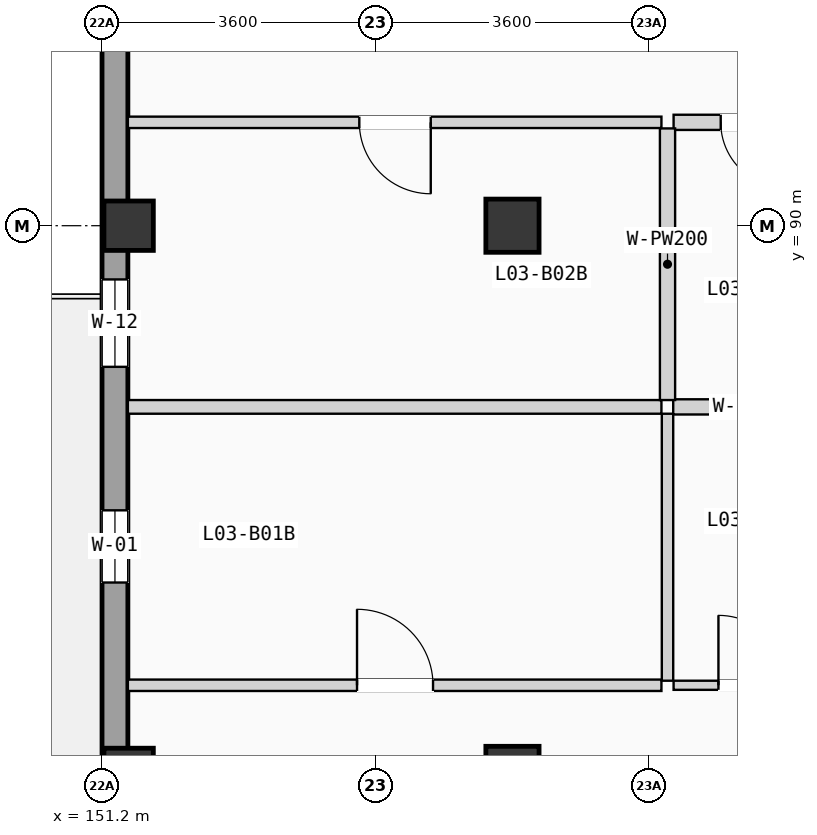
"""IFC4 building model, lengths in metres.
Left out: names, types, materials, properties, quantities, classifications, styles, units other than length and angle.
Written with IfcOpenShell. Run it as: python <this file> out.ifc"""

import sys

from ifc_helpers import new_model, si_unit, direction, frame, frame_2d, origin, origin_2d, place, context, subcontext, project, spatial, rectangle, extrude, element, fill, save


model = new_model("IFC4")
c1 = context("Model", 3, precision=1e-05, world=origin(), true_north=direction((0.0, 1.0)))
c2 = subcontext(c1, "Body", "Model", "MODEL_VIEW")
j1 = project(units=[si_unit("LENGTHUNIT", "METRE"), si_unit("PLANEANGLEUNIT", "RADIAN")], contexts=[c1])
p1 = place(None, origin())
s1 = spatial("IfcSite", under=j1, at=p1, CompositionType="ELEMENT")
p2 = place(p1, origin())
s2 = spatial("IfcBuilding", under=s1, at=p2, CompositionType="ELEMENT")
p3 = place(p2, frame((0.0, 0.0, 12.075)))
s3 = spatial("IfcBuildingStorey", under=s2, at=p3, CompositionType="ELEMENT", Elevation=12.075)
for number, where, z_axis, x_axis in (
    (1, (151.55, 82.8, 0.0), (0.0, 0.0, 1.0), (1.0, 0.0, 0.0)),
    (2, (151.55, 90.0, 0.0), (0.0, 0.0, 1.0), (1.0, 0.0, 0.0)),
):
    element("IfcColumn", number, at=place(p3, frame(where, z_axis=z_axis, x_axis=x_axis)), inside=s3, PredefinedType="COLUMN", context=c2, shape_type="SweptSolid", body=[
        extrude(rectangle(XDim=0.65, YDim=0.65, at=origin_2d()), origin(), (0.0, 0.0, 1.0), 3.15),
    ])
for number, where, z_axis, x_axis in (
    (3, (156.6, 82.8, 0.0), (0.0, 0.0, 1.0), (1.0, 0.0, 0.0)),
    (4, (156.6, 90.0, 0.0), (0.0, 0.0, 1.0), (1.0, 0.0, 0.0)),
):
    element("IfcColumn", number, at=place(p3, frame(where, z_axis=z_axis, x_axis=x_axis)), inside=s3, PredefinedType="COLUMN", context=c2, shape_type="SweptSolid", body=[
        extrude(rectangle(XDim=0.7, YDim=0.7, at=origin_2d()), origin(), (0.0, 0.0, 1.0), 3.15),
    ])
p4 = place(p3, frame((151.37, 68.74, 0.0), z_axis=(0.0, 0.0, 1.0), x_axis=(0.0, 1.0, 0.0)))
e5 = element("IfcWall", 5, at=p4, inside=s3, PredefinedType="SOLIDWALL", context=c2, shape_type="SweptSolid", body=[
    extrude(rectangle(XDim=49.72, YDim=0.34, at=frame_2d((24.86, 0.0))), origin(), (0.0, 0.0, 1.0), 2.89),
])
p5 = place(p4, frame((11.462, 0.0, 0.0)))
e6 = element("IfcOpeningElement", 6, at=p5, cuts=e5, PredefinedType="OPENING", context=c2, shape_type="SweptSolid", body=[
    extrude(rectangle(XDim=0.95, YDim=2.15, at=frame_2d((0.475, 1.075))), frame((0.0, 0.18, 0.0), z_axis=(0.0, -1.0, 0.0), x_axis=(1.0, 0.0, 0.0)), (0.0, 0.0, 1.0), 0.36),
])
p6 = place(p4, frame((8.481, 0.0, 0.555)))
e7 = element("IfcOpeningElement", 7, at=p6, cuts=e5, PredefinedType="OPENING", context=c2, shape_type="SweptSolid", body=[
    extrude(rectangle(XDim=1.05, YDim=1.65, at=frame_2d((0.525, 0.825))), frame((0.0, 0.18, 0.0), z_axis=(0.0, -1.0, 0.0), x_axis=(1.0, 0.0, 0.0)), (0.0, 0.0, 1.0), 0.36),
])
p7 = place(p4, frame((16.565, 0.0, 0.85)))
e8 = element("IfcOpeningElement", 8, at=p7, cuts=e5, PredefinedType="OPENING", context=c2, shape_type="SweptSolid", body=[
    extrude(rectangle(XDim=0.95, YDim=1.2, at=frame_2d((0.475, 0.6))), frame((0.0, 0.18, 0.0), z_axis=(0.0, -1.0, 0.0), x_axis=(1.0, 0.0, 0.0)), (0.0, 0.0, 1.0), 0.36),
])
p8 = place(p4, frame((24.285, 0.0, 0.9)))
e9 = element("IfcOpeningElement", 9, at=p8, cuts=e5, PredefinedType="OPENING", context=c2, shape_type="SweptSolid", body=[
    extrude(rectangle(XDim=1.15, YDim=1.2, at=frame_2d((0.575, 0.6))), frame((0.0, 0.18, 0.0), z_axis=(0.0, -1.0, 0.0), x_axis=(1.0, 0.0, 0.0)), (0.0, 0.0, 1.0), 0.36),
])
p9 = place(p4, frame((19.403, 0.0, 0.855)))
e10 = element("IfcOpeningElement", 10, at=p9, cuts=e5, PredefinedType="OPENING", context=c2, shape_type="SweptSolid", body=[
    extrude(rectangle(XDim=1.15, YDim=1.35, at=frame_2d((0.575, 0.675))), frame((0.0, 0.18, 0.0), z_axis=(0.0, -1.0, 0.0), x_axis=(1.0, 0.0, 0.0)), (0.0, 0.0, 1.0), 0.36),
])
p10 = place(p4, frame((29.167, 0.0, 0.705)))
e11 = element("IfcOpeningElement", 11, at=p10, cuts=e5, PredefinedType="OPENING", context=c2, shape_type="SweptSolid", body=[
    extrude(rectangle(XDim=1.15, YDim=1.5, at=frame_2d((0.575, 0.75))), frame((0.0, 0.18, 0.0), z_axis=(0.0, -1.0, 0.0), x_axis=(1.0, 0.0, 0.0)), (0.0, 0.0, 1.0), 0.36),
])
p11 = place(p4, frame((37.243, 0.0, 0.0)))
e12 = element("IfcOpeningElement", 12, at=p11, cuts=e5, PredefinedType="OPENING", context=c2, shape_type="SweptSolid", body=[
    extrude(rectangle(XDim=1.08, YDim=2.18, at=frame_2d((0.54, 1.09))), frame((0.0, 0.18, 0.0), z_axis=(0.0, -1.0, 0.0), x_axis=(1.0, 0.0, 0.0)), (0.0, 0.0, 1.0), 0.36),
])
p12 = place(p4, frame((32.106, 0.0, 0.555)))
e13 = element("IfcOpeningElement", 13, at=p12, cuts=e5, PredefinedType="OPENING", context=c2, shape_type="SweptSolid", body=[
    extrude(rectangle(XDim=1.15, YDim=1.65, at=frame_2d((0.575, 0.825))), frame((0.0, 0.18, 0.0), z_axis=(0.0, -1.0, 0.0), x_axis=(1.0, 0.0, 0.0)), (0.0, 0.0, 1.0), 0.36),
])
p13 = place(p4, frame((40.239, 0.0, 0.85)))
e14 = element("IfcOpeningElement", 14, at=p13, cuts=e5, PredefinedType="OPENING", context=c2, shape_type="SweptSolid", body=[
    extrude(rectangle(XDim=0.95, YDim=1.2, at=frame_2d((0.475, 0.6))), frame((0.0, 0.18, 0.0), z_axis=(0.0, -1.0, 0.0), x_axis=(1.0, 0.0, 0.0)), (0.0, 0.0, 1.0), 0.36),
])
p14 = place(p3, frame((158.72, 83.953, 0.0), z_axis=(0.0, 0.0, 1.0), x_axis=(1.0, 0.0, 0.0)))
e15 = element("IfcWall", 15, at=p14, inside=s3, PredefinedType="PARTITIONING", context=c2, shape_type="SweptSolid", body=[
    extrude(rectangle(XDim=2.107, YDim=0.12, at=frame_2d((1.053, 0.0))), origin(), (0.0, 0.0, 1.0), 2.87),
])
p15 = place(p14, frame((0.59, 0.0, 0.0)))
e16 = element("IfcOpeningElement", 16, at=p15, cuts=e15, PredefinedType="OPENING", context=c2, shape_type="SweptSolid", body=[
    extrude(rectangle(XDim=0.92, YDim=2.02, at=frame_2d((0.46, 1.01))), frame((0.0, 0.07, 0.0), z_axis=(0.0, -1.0, 0.0), x_axis=(1.0, 0.0, 0.0)), (0.0, 0.0, 1.0), 0.14),
])
p16 = place(p3, frame((151.54, 83.953, 0.0), z_axis=(0.0, 0.0, 1.0), x_axis=(1.0, 0.0, 0.0)))
e17 = element("IfcWall", 17, at=p16, inside=s3, PredefinedType="PARTITIONING", context=c2, shape_type="SweptSolid", body=[
    extrude(rectangle(XDim=7.02, YDim=0.15, at=frame_2d((3.51, 0.0))), origin(), (0.0, 0.0, 1.0), 2.87),
])
p17 = place(p16, frame((3.015, 0.0, 0.0)))
e18 = element("IfcOpeningElement", 18, at=p17, cuts=e17, PredefinedType="OPENING", context=c2, shape_type="SweptSolid", body=[
    extrude(rectangle(XDim=1.0, YDim=2.06, at=frame_2d((0.5, 1.03))), frame((0.0, 0.085, 0.0), z_axis=(0.0, -1.0, 0.0), x_axis=(1.0, 0.0, 0.0)), (0.0, 0.0, 1.0), 0.17),
])
p18 = place(p3, frame((158.64, 84.013, 0.0), z_axis=(0.0, 0.0, 1.0), x_axis=(0.0, 1.0, 0.0)))
e19 = element("IfcWall", 19, at=p18, inside=s3, PredefinedType="PARTITIONING", context=c2, shape_type="SweptSolid", body=[
    extrude(rectangle(XDim=3.513, YDim=0.15, at=frame_2d((1.756, 0.0))), origin(), (0.0, 0.0, 1.0), 2.87),
])
p19 = place(p3, frame((158.715, 87.616, 0.0), z_axis=(0.0, 0.0, 1.0), x_axis=(1.0, 0.0, 0.0)))
e20 = element("IfcWall", 20, at=p19, inside=s3, PredefinedType="PLUMBINGWALL", context=c2, shape_type="SweptSolid", body=[
    extrude(rectangle(XDim=2.112, YDim=0.2, at=frame_2d((1.056, 0.0))), origin(), (0.0, 0.0, 1.0), 2.87),
])
p20 = place(p3, frame((151.54, 87.616, 0.0), z_axis=(0.0, 0.0, 1.0), x_axis=(1.0, 0.0, 0.0)))
e21 = element("IfcWall", 21, at=p20, inside=s3, PredefinedType="PARTITIONING", context=c2, shape_type="SweptSolid", body=[
    extrude(rectangle(XDim=7.02, YDim=0.18, at=frame_2d((3.51, 0.0))), origin(), (0.0, 0.0, 1.0), 2.87),
])
p21 = place(p3, frame((158.72, 91.36, 0.0), z_axis=(0.0, 0.0, 1.0), x_axis=(1.0, 0.0, 0.0)))
e22 = element("IfcWall", 22, at=p21, inside=s3, PredefinedType="PLUMBINGWALL", context=c2, shape_type="SweptSolid", body=[
    extrude(rectangle(XDim=2.107, YDim=0.2, at=frame_2d((1.053, 0.0))), origin(), (0.0, 0.0, 1.0), 2.87),
])
p22 = place(p21, frame((0.62, 0.0, 0.0)))
e23 = element("IfcOpeningElement", 23, at=p22, cuts=e22, PredefinedType="OPENING", context=c2, shape_type="SweptSolid", body=[
    extrude(rectangle(XDim=0.86, YDim=2.0, at=frame_2d((0.43, 1.0))), frame((0.0, 0.11, 0.0), z_axis=(0.0, -1.0, 0.0), x_axis=(1.0, 0.0, 0.0)), (0.0, 0.0, 1.0), 0.22),
])
p23 = place(p3, frame((151.54, 91.36, 0.0), z_axis=(0.0, 0.0, 1.0), x_axis=(1.0, 0.0, 0.0)))
e24 = element("IfcWall", 24, at=p23, inside=s3, PredefinedType="PARTITIONING", context=c2, shape_type="SweptSolid", body=[
    extrude(rectangle(XDim=7.02, YDim=0.15, at=frame_2d((3.51, 0.0))), origin(), (0.0, 0.0, 1.0), 2.87),
])
p24 = place(p23, frame((3.045, 0.0, 0.0)))
e25 = element("IfcOpeningElement", 25, at=p24, cuts=e24, PredefinedType="OPENING", context=c2, shape_type="SweptSolid", body=[
    extrude(rectangle(XDim=0.94, YDim=2.06, at=frame_2d((0.47, 1.03))), frame((0.0, 0.085, 0.0), z_axis=(0.0, -1.0, 0.0), x_axis=(1.0, 0.0, 0.0)), (0.0, 0.0, 1.0), 0.17),
])
p25 = place(p3, frame((158.64, 87.706, 0.0), z_axis=(0.0, 0.0, 1.0), x_axis=(0.0, 1.0, 0.0)))
e26 = element("IfcWall", 26, at=p25, inside=s3, PredefinedType="PLUMBINGWALL", context=c2, shape_type="SweptSolid", body=[
    extrude(rectangle(XDim=3.574, YDim=0.2, at=frame_2d((1.787, 0.0))), origin(), (0.0, 0.0, 1.0), 2.87),
])
p26 = place(p7, origin())
e27 = element("IfcWindow", 27, at=p26, inside=s3, PartitioningType="SINGLE_PANEL", PredefinedType="WINDOW", context=c2, shape_type="SweptSolid", body=[
    extrude(rectangle(XDim=0.95, YDim=1.2, at=frame_2d((0.475, 0.6))), frame((0.0, 0.03, 0.0), z_axis=(0.0, -1.0, 0.0), x_axis=(1.0, 0.0, 0.0)), (0.0, 0.0, 1.0), 0.06),
])
fill(e8, e27)
p27 = place(p9, origin())
e28 = element("IfcWindow", 28, at=p27, inside=s3, PartitioningType="SINGLE_PANEL", PredefinedType="WINDOW", context=c2, shape_type="SweptSolid", body=[
    extrude(rectangle(XDim=1.15, YDim=1.35, at=frame_2d((0.575, 0.675))), frame((0.0, 0.03, 0.0), z_axis=(0.0, -1.0, 0.0), x_axis=(1.0, 0.0, 0.0)), (0.0, 0.0, 1.0), 0.06),
])
fill(e10, e28)
p28 = place(p15, origin())
e29 = element("IfcDoor", 29, at=p28, inside=s3, OperationType="SINGLE_SWING_LEFT", PredefinedType="DOOR", context=c2, shape_type="SweptSolid", body=[
    extrude(rectangle(XDim=0.92, YDim=2.02, at=frame_2d((0.46, 1.01))), frame((0.0, 0.025, 0.0), z_axis=(0.0, -1.0, 0.0), x_axis=(1.0, 0.0, 0.0)), (0.0, 0.0, 1.0), 0.05),
])
fill(e16, e29)
p29 = place(p17, origin())
e30 = element("IfcDoor", 30, at=p29, inside=s3, OperationType="SINGLE_SWING_LEFT", PredefinedType="DOOR", context=c2, shape_type="SweptSolid", body=[
    extrude(rectangle(XDim=1.0, YDim=2.06, at=frame_2d((0.5, 1.03))), frame((0.0, 0.025, 0.0), z_axis=(0.0, -1.0, 0.0), x_axis=(1.0, 0.0, 0.0)), (0.0, 0.0, 1.0), 0.05),
])
fill(e18, e30)
p30 = place(p22, frame((0.86, 0.0, 0.0), z_axis=(0.0, 0.0, 1.0), x_axis=(-1.0, 0.0, 0.0)))
e31 = element("IfcDoor", 31, at=p30, inside=s3, OperationType="SINGLE_SWING_RIGHT", PredefinedType="DOOR", context=c2, shape_type="SweptSolid", body=[
    extrude(rectangle(XDim=0.86, YDim=2.0, at=frame_2d((0.43, 1.0))), frame((0.0, 0.025, 0.0), z_axis=(0.0, -1.0, 0.0), x_axis=(1.0, 0.0, 0.0)), (0.0, 0.0, 1.0), 0.05),
])
fill(e23, e31)
p31 = place(p24, frame((0.94, 0.0, 0.0), z_axis=(0.0, 0.0, 1.0), x_axis=(-1.0, 0.0, 0.0)))
e32 = element("IfcDoor", 32, at=p31, inside=s3, OperationType="SINGLE_SWING_RIGHT", PredefinedType="DOOR", context=c2, shape_type="SweptSolid", body=[
    extrude(rectangle(XDim=0.94, YDim=2.06, at=frame_2d((0.47, 1.03))), frame((0.0, 0.025, 0.0), z_axis=(0.0, -1.0, 0.0), x_axis=(1.0, 0.0, 0.0)), (0.0, 0.0, 1.0), 0.05),
])
fill(e25, e32)
save(model, sys.argv[1])
